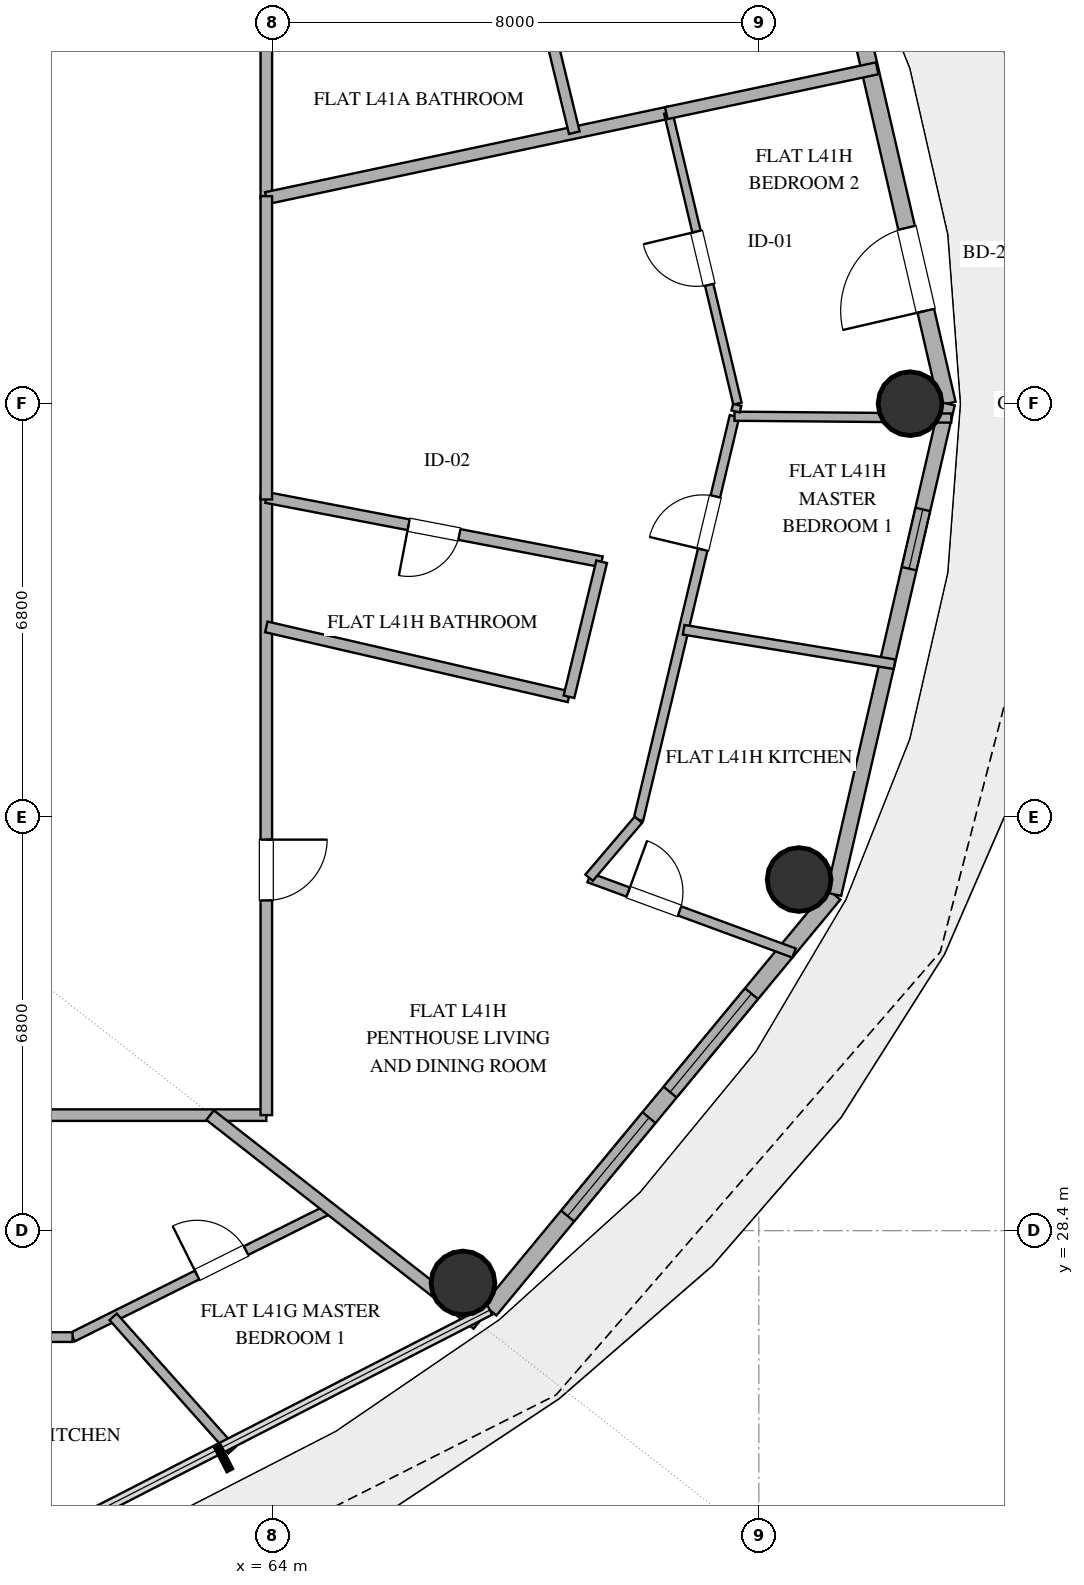
"""IFC4 building model, lengths in metres.
Left out: names, types, materials, properties, quantities, classifications, styles, units other than length and angle.
Written with IfcOpenShell. Run it as: python <this file> out.ifc"""

import sys

from ifc_helpers import new_model, si_unit, direction, frame, frame_2d, origin, origin_2d, place, context, subcontext, project, spatial, rectangle, hollow_circle, extrude, element, fill, save


model = new_model("IFC4")
c1 = context("Model", 3, precision=1e-05, world=origin(), true_north=direction((0.0, 1.0)))
c2 = subcontext(c1, "Body", "Model", "MODEL_VIEW")
j1 = project(units=[si_unit("LENGTHUNIT", "METRE"), si_unit("PLANEANGLEUNIT", "RADIAN")], contexts=[c1])
p1 = place(None, origin())
s1 = spatial("IfcSite", under=j1, at=p1, CompositionType="ELEMENT")
p2 = place(p1, origin())
s2 = spatial("IfcBuilding", under=s1, at=p2, CompositionType="ELEMENT")
p3 = place(p2, frame((0.0, 0.0, 165.0)))
s3 = spatial("IfcBuildingStorey", under=s2, at=p3, CompositionType="ELEMENT", Elevation=165.0)
for number, where, z_axis, x_axis in (
    (1, (74.487, 42.0, 0.0), (0.0, 0.0, 1.0), (1.0, 0.0, 0.0)),
    (2, (67.134, 27.54, 0.0), (0.0, 0.0, 1.0), (1.0, 0.0, 0.0)),
    (3, (72.662, 34.174, 0.0), (0.0, 0.0, 1.0), (1.0, 0.0, 0.0)),
):
    element("IfcColumn", number, at=place(p3, frame(where, z_axis=z_axis, x_axis=x_axis)), inside=s3, PredefinedType="COLUMN", context=c2, shape_type="SweptSolid", body=[
        extrude(hollow_circle(Radius=0.525, WallThickness=0.028, at=origin_2d()), origin(), (0.0, 0.0, 1.0), 3.38),
    ])
p4 = place(p3, frame((75.099, 42.0, 0.0), z_axis=(0.0, 0.0, 1.0), x_axis=(-0.225473184558, 0.974249374157, 0.0)))
e4 = element("IfcWall", 4, at=p4, inside=s3, PredefinedType="SOLIDWALL", context=c2, shape_type="SweptSolid", body=[
    extrude(rectangle(XDim=8.28, YDim=0.28, at=frame_2d((4.14, 0.0))), origin(), (0.0, 0.0, 1.0), 3.38),
])
p5 = place(p4, frame((1.568, 0.0, 0.0)))
e5 = element("IfcOpeningElement", 5, at=p5, cuts=e4, PredefinedType="OPENING", context=c2, shape_type="SweptSolid", body=[
    extrude(rectangle(XDim=1.4, YDim=2.2, at=frame_2d((0.7, 1.1))), frame((0.0, 0.15, 0.0), z_axis=(0.0, -1.0, 0.0), x_axis=(1.0, 0.0, 0.0)), (0.0, 0.0, 1.0), 0.3),
])
p6 = place(p3, frame((67.576, 27.094, 0.0), z_axis=(0.0, 0.0, 1.0), x_axis=(0.637333477683, 0.770588111915, 0.0)))
e6 = element("IfcWall", 6, at=p6, inside=s3, PredefinedType="SOLIDWALL", context=c2, shape_type="SweptSolid", body=[
    extrude(rectangle(XDim=8.875, YDim=0.28, at=frame_2d((4.438, 0.0))), origin(), (0.0, 0.0, 1.0), 3.38),
])
p7 = place(p6, frame((2.007, 0.0, 0.85)))
e7 = element("IfcOpeningElement", 7, at=p7, cuts=e6, PredefinedType="OPENING", context=c2, shape_type="SweptSolid", body=[
    extrude(rectangle(XDim=2.1, YDim=2.2, at=frame_2d((1.05, 1.1))), frame((0.0, 0.15, 0.0), z_axis=(0.0, -1.0, 0.0), x_axis=(1.0, 0.0, 0.0)), (0.0, 0.0, 1.0), 0.3),
])
p8 = place(p6, frame((4.652, 0.0, 0.85)))
e8 = element("IfcOpeningElement", 8, at=p8, cuts=e6, PredefinedType="OPENING", context=c2, shape_type="SweptSolid", body=[
    extrude(rectangle(XDim=2.1, YDim=2.2, at=frame_2d((1.05, 1.1))), frame((0.0, 0.15, 0.0), z_axis=(0.0, -1.0, 0.0), x_axis=(1.0, 0.0, 0.0)), (0.0, 0.0, 1.0), 0.3),
])
p9 = place(p3, frame((73.232, 33.933, 0.0), z_axis=(0.0, 0.0, 1.0), x_axis=(0.225473184558, 0.974249374157, 0.0)))
e9 = element("IfcWall", 9, at=p9, inside=s3, PredefinedType="SOLIDWALL", context=c2, shape_type="SweptSolid", body=[
    extrude(rectangle(XDim=8.28, YDim=0.25, at=frame_2d((4.14, 0.0))), origin(), (0.0, 0.0, 1.0), 3.38),
])
p10 = place(p9, frame((5.495, 0.0, 1.42)))
e10 = element("IfcOpeningElement", 10, at=p10, cuts=e9, PredefinedType="OPENING", context=c2, shape_type="SweptSolid", body=[
    extrude(rectangle(XDim=1.0, YDim=1.05, at=frame_2d((0.5, 0.525))), frame((0.0, 0.135, 0.0), z_axis=(0.0, -1.0, 0.0), x_axis=(1.0, 0.0, 0.0)), (0.0, 0.0, 1.0), 0.27),
])
p11 = place(p3, frame((63.9, 30.3, 0.0), z_axis=(0.0, 0.0, 1.0), x_axis=(-1.0, 0.0, 0.0)))
e11 = element("IfcWall", 11, at=p11, inside=s3, PredefinedType="PARTITIONING", context=c2, shape_type="SweptSolid", body=[
    extrude(rectangle(XDim=15.625, YDim=0.19, at=frame_2d((7.813, 0.0))), origin(), (0.0, 0.0, 1.0), 2.74),
])
p12 = place(p11, frame((6.137, 0.0, 0.0)))
e12 = element("IfcOpeningElement", 12, at=p12, cuts=e11, PredefinedType="OPENING", context=c2, shape_type="SweptSolid", body=[
    extrude(rectangle(XDim=1.0, YDim=2.2, at=frame_2d((0.5, 1.1))), frame((0.0, 0.105, 0.0), z_axis=(0.0, -1.0, 0.0), x_axis=(1.0, 0.0, 0.0)), (0.0, 0.0, 1.0), 0.21),
])
p13 = place(p3, frame((63.9, 40.49, 0.0), z_axis=(0.0, 0.0, 1.0), x_axis=(0.0, -1.0, 0.0)))
e13 = element("IfcWall", 13, at=p13, inside=s3, PredefinedType="PARTITIONING", context=c2, shape_type="SweptSolid", body=[
    extrude(rectangle(XDim=10.19, YDim=0.19, at=frame_2d((5.095, 0.0))), origin(), (0.0, 0.0, 1.0), 2.74),
])
p14 = place(p13, frame((5.659, 0.0, 0.0)))
e14 = element("IfcOpeningElement", 14, at=p14, cuts=e13, PredefinedType="OPENING", context=c2, shape_type="SweptSolid", body=[
    extrude(rectangle(XDim=1.0, YDim=2.2, at=frame_2d((0.5, 1.1))), frame((0.0, 0.105, 0.0), z_axis=(0.0, -1.0, 0.0), x_axis=(1.0, 0.0, 0.0)), (0.0, 0.0, 1.0), 0.21),
])
p15 = place(p3, frame((69.415, 39.4, 0.0), z_axis=(0.0, 0.0, 1.0), x_axis=(-0.98210492306, 0.188334596135, 0.0)))
e15 = element("IfcWall", 15, at=p15, inside=s3, PredefinedType="PLUMBINGWALL", context=c2, shape_type="SweptSolid", body=[
    extrude(rectangle(XDim=5.616, YDim=0.18, at=frame_2d((2.808, 0.0))), origin(), (0.0, 0.0, 1.0), 2.74),
])
p16 = place(p15, frame((2.383, 0.0, 0.0)))
e16 = element("IfcOpeningElement", 16, at=p16, cuts=e15, PredefinedType="OPENING", context=c2, shape_type="SweptSolid", body=[
    extrude(rectangle(XDim=0.85, YDim=2.1, at=frame_2d((0.425, 1.05))), frame((0.0, 0.1, 0.0), z_axis=(0.0, -1.0, 0.0), x_axis=(1.0, 0.0, 0.0)), (0.0, 0.0, 1.0), 0.2),
])
p17 = place(p3, frame((63.9, 53.7, 0.0), z_axis=(0.0, 0.0, 1.0), x_axis=(0.0, -1.0, 0.0)))
e17 = element("IfcWall", 17, at=p17, inside=s3, PredefinedType="PARTITIONING", context=c2, shape_type="SweptSolid", body=[
    extrude(rectangle(XDim=8.32, YDim=0.19, at=frame_2d((4.16, 0.0))), origin(), (0.0, 0.0, 1.0), 2.74),
])
p18 = place(p3, frame((63.9, 45.38, 0.0), z_axis=(0.0, 0.0, 1.0), x_axis=(0.978145779981, 0.207920256603, 0.0)))
e18 = element("IfcWall", 18, at=p18, inside=s3, PredefinedType="PARTITIONING", context=c2, shape_type="SweptSolid", body=[
    extrude(rectangle(XDim=6.789, YDim=0.2, at=frame_2d((3.395, 0.0))), origin(), (0.0, 0.0, 1.0), 2.74),
])
p19 = place(p3, frame((63.9, 38.329, 0.0), z_axis=(0.0, 0.0, 1.0), x_axis=(0.974377500084, -0.224918846098, 0.0)))
e19 = element("IfcWall", 19, at=p19, inside=s3, PredefinedType="PLUMBINGWALL", context=c2, shape_type="SweptSolid", body=[
    extrude(rectangle(XDim=5.108, YDim=0.18, at=frame_2d((2.554, 0.0))), origin(), (0.0, 0.0, 1.0), 2.74),
])
p20 = place(p3, frame((63.9, 45.412, 0.0), z_axis=(0.0, 0.0, 1.0), x_axis=(0.0, -1.0, 0.0)))
e20 = element("IfcWall", 20, at=p20, inside=s3, PredefinedType="PARTITIONING", context=c2, shape_type="SweptSolid", body=[
    extrude(rectangle(XDim=4.987, YDim=0.19, at=frame_2d((2.494, 0.0))), origin(), (0.0, 0.0, 1.0), 2.74),
])
p21 = place(p3, frame((71.649, 42.0, 0.0), z_axis=(0.0, 0.0, 1.0), x_axis=(-0.231622764326, 0.972805682059, 0.0)))
e21 = element("IfcWall", 21, at=p21, inside=s3, PredefinedType="PARTITIONING", context=c2, shape_type="SweptSolid", body=[
    extrude(rectangle(XDim=4.918, YDim=0.14, at=frame_2d((2.459, 0.0))), origin(), (0.0, 0.0, 1.0), 2.74),
])
p22 = place(p21, frame((2.009, 0.0, 0.0)))
e22 = element("IfcOpeningElement", 22, at=p22, cuts=e21, PredefinedType="OPENING", context=c2, shape_type="SweptSolid", body=[
    extrude(rectangle(XDim=0.9, YDim=2.1, at=frame_2d((0.45, 1.05))), frame((0.0, 0.08, 0.0), z_axis=(0.0, -1.0, 0.0), x_axis=(1.0, 0.0, 0.0)), (0.0, 0.0, 1.0), 0.16),
])
p23 = place(p3, frame((60.713, 26.65, 0.0), z_axis=(0.0, 0.0, 1.0), x_axis=(0.894932492822, 0.446201561283, 0.0)))
e23 = element("IfcWall", 23, at=p23, inside=s3, PredefinedType="PLUMBINGWALL", context=c2, shape_type="SweptSolid", body=[
    extrude(rectangle(XDim=4.729, YDim=0.16, at=frame_2d((2.365, 0.0))), origin(), (0.0, 0.0, 1.0), 2.74),
])
p24 = place(p23, frame((2.288, 0.0, 0.0)))
e24 = element("IfcOpeningElement", 24, at=p24, cuts=e23, PredefinedType="OPENING", context=c2, shape_type="SweptSolid", body=[
    extrude(rectangle(XDim=0.9, YDim=2.1, at=frame_2d((0.45, 1.05))), frame((0.0, 0.09, 0.0), z_axis=(0.0, -1.0, 0.0), x_axis=(1.0, 0.0, 0.0)), (0.0, 0.0, 1.0), 0.18),
])
p25 = place(p3, frame((70.019, 35.158, 0.0), z_axis=(0.0, 0.0, 1.0), x_axis=(0.231657621012, 0.972797382103, 0.0)))
e25 = element("IfcWall", 25, at=p25, inside=s3, PredefinedType="PLUMBINGWALL", context=c2, shape_type="SweptSolid", body=[
    extrude(rectangle(XDim=6.822, YDim=0.16, at=frame_2d((3.411, 0.0))), origin(), (0.0, 0.0, 1.0), 2.74),
])
p26 = place(p25, frame((4.567, 0.0, 0.0)))
e26 = element("IfcOpeningElement", 26, at=p26, cuts=e25, PredefinedType="OPENING", context=c2, shape_type="SweptSolid", body=[
    extrude(rectangle(XDim=0.9, YDim=2.1, at=frame_2d((0.45, 1.05))), frame((0.0, 0.09, 0.0), z_axis=(0.0, -1.0, 0.0), x_axis=(1.0, 0.0, 0.0)), (0.0, 0.0, 1.0), 0.18),
])
p27 = place(p3, frame((69.208, 34.205, 0.0), z_axis=(0.0, 0.0, 1.0), x_axis=(0.938602834346, -0.344999593272, 0.0)))
e27 = element("IfcWall", 27, at=p27, inside=s3, PredefinedType="PLUMBINGWALL", context=c2, shape_type="SweptSolid", body=[
    extrude(rectangle(XDim=3.591, YDim=0.16, at=frame_2d((1.796, 0.0))), origin(), (0.0, 0.0, 1.0), 2.74),
])
p28 = place(p27, frame((0.686, 0.0, 0.0)))
e28 = element("IfcOpeningElement", 28, at=p28, cuts=e27, PredefinedType="OPENING", context=c2, shape_type="SweptSolid", body=[
    extrude(rectangle(XDim=0.9, YDim=2.1, at=frame_2d((0.45, 1.05))), frame((0.0, 0.09, 0.0), z_axis=(0.0, -1.0, 0.0), x_axis=(1.0, 0.0, 0.0)), (0.0, 0.0, 1.0), 0.18),
])
p29 = place(p3, frame((75.165, 41.763, 0.0), z_axis=(0.0, 0.0, 1.0), x_axis=(-0.999962184605, 0.00869651424, 0.0)))
e29 = element("IfcWall", 29, at=p29, inside=s3, PredefinedType="PARTITIONING", context=c2, shape_type="SweptSolid", body=[
    extrude(rectangle(XDim=3.565, YDim=0.15, at=frame_2d((1.783, 0.0))), origin(), (0.0, 0.0, 1.0), 2.74),
])
p30 = place(p3, frame((73.946, 47.515, 0.0), z_axis=(0.0, 0.0, 1.0), x_axis=(-0.978135742848, -0.207967469966, 0.0)))
e30 = element("IfcWall", 30, at=p30, inside=s3, PredefinedType="PARTITIONING", context=c2, shape_type="SweptSolid", body=[
    extrude(rectangle(XDim=3.545, YDim=0.2, at=frame_2d((1.773, 0.0))), origin(), (0.0, 0.0, 1.0), 2.74),
])
p31 = place(p3, frame((74.231, 37.716, 0.0), z_axis=(0.0, 0.0, 1.0), x_axis=(-0.986918442879, 0.161220306117, 0.0)))
e31 = element("IfcWall", 31, at=p31, inside=s3, PredefinedType="PLUMBINGWALL", context=c2, shape_type="SweptSolid", body=[
    extrude(rectangle(XDim=3.513, YDim=0.16, at=frame_2d((1.757, 0.0))), origin(), (0.0, 0.0, 1.0), 2.74),
])
p32 = place(p3, frame((67.37, 26.866, 0.0), z_axis=(0.0, 0.0, 1.0), x_axis=(-0.788004464355, 0.615669525117, 0.0)))
e32 = element("IfcWall", 32, at=p32, inside=s3, PredefinedType="PARTITIONING", context=c2, shape_type="SweptSolid", body=[
    extrude(rectangle(XDim=5.577, YDim=0.2, at=frame_2d((2.789, 0.0))), origin(), (0.0, 0.0, 1.0), 2.74),
])
p33 = place(p3, frame((63.335, 24.79, 0.0), z_axis=(0.0, 0.0, 1.0), x_axis=(-0.665255741341, 0.746615562799, 0.0)))
e33 = element("IfcWall", 33, at=p33, inside=s3, PredefinedType="PLUMBINGWALL", context=c2, shape_type="SweptSolid", body=[
    extrude(rectangle(XDim=2.938, YDim=0.16, at=frame_2d((1.469, 0.0))), origin(), (0.0, 0.0, 1.0), 2.74),
])
p34 = place(p3, frame((68.877, 37.18, 0.0), z_axis=(0.0, 0.0, 1.0), x_axis=(0.235462364404, 0.971883467783, 0.0)))
e34 = element("IfcWall", 34, at=p34, inside=s3, PredefinedType="PLUMBINGWALL", context=c2, shape_type="SweptSolid", body=[
    extrude(rectangle(XDim=2.284, YDim=0.18, at=frame_2d((1.142, 0.0))), origin(), (0.0, 0.0, 1.0), 2.74),
])
p35 = place(p3, frame((68.965, 46.456, 0.0), z_axis=(0.0, 0.0, 1.0), x_axis=(-0.235442613623, 0.971888252676, 0.0)))
e35 = element("IfcWall", 35, at=p35, inside=s3, PredefinedType="PLUMBINGWALL", context=c2, shape_type="SweptSolid", body=[
    extrude(rectangle(XDim=1.865, YDim=0.18, at=frame_2d((0.932, 0.0))), origin(), (0.0, 0.0, 1.0), 2.74),
])
p36 = place(p3, frame((70.02, 35.158, 0.0), z_axis=(0.0, 0.0, 1.0), x_axis=(-0.648152333742, -0.761510703972, 0.0)))
e36 = element("IfcWall", 36, at=p36, inside=s3, PredefinedType="PLUMBINGWALL", context=c2, shape_type="SweptSolid", body=[
    extrude(rectangle(XDim=1.251, YDim=0.16, at=frame_2d((0.625, 0.0))), origin(), (0.0, 0.0, 1.0), 2.74),
])
p37 = place(p3, frame((60.713, 26.65, 0.0), z_axis=(0.0, 0.0, 1.0), x_axis=(-1.0, 0.0, 0.0)))
e37 = element("IfcWall", 37, at=p37, inside=s3, PredefinedType="PLUMBINGWALL", context=c2, shape_type="SweptSolid", body=[
    extrude(rectangle(XDim=1.062, YDim=0.16, at=frame_2d((0.531, 0.0))), origin(), (0.0, 0.0, 1.0), 2.74),
])
p38 = place(p3, frame((71.618, 41.872, 0.0), z_axis=(0.0, 0.0, 1.0), x_axis=(0.233786115402, 0.972288050037, 0.0)))
e38 = element("IfcWall", 38, at=p38, inside=s3, PredefinedType="PARTITIONING", context=c2, shape_type="SweptSolid", body=[
    extrude(rectangle(XDim=0.112, YDim=0.14, at=frame_2d((0.056, 0.0))), origin(), (0.0, 0.0, 1.0), 2.74),
])
p39 = place(p5, origin())
e39 = element("IfcDoor", 39, at=p39, inside=s3, OperationType="SINGLE_SWING_LEFT", PredefinedType="DOOR", context=c2, shape_type="SweptSolid", body=[
    extrude(rectangle(XDim=1.4, YDim=2.2, at=frame_2d((0.7, 1.1))), frame((0.0, 0.025, 0.0), z_axis=(0.0, -1.0, 0.0), x_axis=(1.0, 0.0, 0.0)), (0.0, 0.0, 1.0), 0.05),
])
fill(e5, e39)
p40 = place(p7, origin())
e40 = element("IfcWindow", 40, at=p40, inside=s3, PartitioningType="SINGLE_PANEL", PredefinedType="WINDOW", context=c2, shape_type="SweptSolid", body=[
    extrude(rectangle(XDim=2.1, YDim=2.2, at=frame_2d((1.05, 1.1))), frame((0.0, 0.03, 0.0), z_axis=(0.0, -1.0, 0.0), x_axis=(1.0, 0.0, 0.0)), (0.0, 0.0, 1.0), 0.06),
])
fill(e7, e40)
p41 = place(p8, origin())
e41 = element("IfcWindow", 41, at=p41, inside=s3, PartitioningType="SINGLE_PANEL", PredefinedType="WINDOW", context=c2, shape_type="SweptSolid", body=[
    extrude(rectangle(XDim=2.1, YDim=2.2, at=frame_2d((1.05, 1.1))), frame((0.0, 0.03, 0.0), z_axis=(0.0, -1.0, 0.0), x_axis=(1.0, 0.0, 0.0)), (0.0, 0.0, 1.0), 0.06),
])
fill(e8, e41)
p42 = place(p10, origin())
e42 = element("IfcWindow", 42, at=p42, inside=s3, PartitioningType="SINGLE_PANEL", PredefinedType="WINDOW", context=c2, shape_type="SweptSolid", body=[
    extrude(rectangle(XDim=1.0, YDim=1.05, at=frame_2d((0.5, 0.525))), frame((0.0, 0.03, 0.0), z_axis=(0.0, -1.0, 0.0), x_axis=(1.0, 0.0, 0.0)), (0.0, 0.0, 1.0), 0.06),
])
fill(e10, e42)
p43 = place(p14, origin())
e43 = element("IfcDoor", 43, at=p43, inside=s3, OperationType="SINGLE_SWING_LEFT", PredefinedType="DOOR", context=c2, shape_type="SweptSolid", body=[
    extrude(rectangle(XDim=1.0, YDim=2.2, at=frame_2d((0.5, 1.1))), frame((0.0, 0.025, 0.0), z_axis=(0.0, -1.0, 0.0), x_axis=(1.0, 0.0, 0.0)), (0.0, 0.0, 1.0), 0.05),
])
fill(e14, e43)
p44 = place(p16, origin())
e44 = element("IfcDoor", 44, at=p44, inside=s3, OperationType="SINGLE_SWING_RIGHT", PredefinedType="DOOR", context=c2, shape_type="SweptSolid", body=[
    extrude(rectangle(XDim=0.85, YDim=2.1, at=frame_2d((0.425, 1.05))), frame((0.0, 0.025, 0.0), z_axis=(0.0, -1.0, 0.0), x_axis=(1.0, 0.0, 0.0)), (0.0, 0.0, 1.0), 0.05),
])
fill(e16, e44)
p45 = place(p22, origin())
e45 = element("IfcDoor", 45, at=p45, inside=s3, OperationType="SINGLE_SWING_RIGHT", PredefinedType="DOOR", context=c2, shape_type="SweptSolid", body=[
    extrude(rectangle(XDim=0.9, YDim=2.1, at=frame_2d((0.45, 1.05))), frame((0.0, 0.025, 0.0), z_axis=(0.0, -1.0, 0.0), x_axis=(1.0, 0.0, 0.0)), (0.0, 0.0, 1.0), 0.05),
])
fill(e22, e45)
p46 = place(p24, origin())
e46 = element("IfcDoor", 46, at=p46, inside=s3, OperationType="SINGLE_SWING_LEFT", PredefinedType="DOOR", context=c2, shape_type="SweptSolid", body=[
    extrude(rectangle(XDim=0.9, YDim=2.1, at=frame_2d((0.45, 1.05))), frame((0.0, 0.025, 0.0), z_axis=(0.0, -1.0, 0.0), x_axis=(1.0, 0.0, 0.0)), (0.0, 0.0, 1.0), 0.05),
])
fill(e24, e46)
p47 = place(p26, origin())
e47 = element("IfcDoor", 47, at=p47, inside=s3, OperationType="SINGLE_SWING_LEFT", PredefinedType="DOOR", context=c2, shape_type="SweptSolid", body=[
    extrude(rectangle(XDim=0.9, YDim=2.1, at=frame_2d((0.45, 1.05))), frame((0.0, 0.025, 0.0), z_axis=(0.0, -1.0, 0.0), x_axis=(1.0, 0.0, 0.0)), (0.0, 0.0, 1.0), 0.05),
])
fill(e26, e47)
p48 = place(p28, origin())
e48 = element("IfcDoor", 48, at=p48, inside=s3, OperationType="SINGLE_SWING_LEFT", PredefinedType="DOOR", context=c2, shape_type="SweptSolid", body=[
    extrude(rectangle(XDim=0.9, YDim=2.1, at=frame_2d((0.45, 1.05))), frame((0.0, 0.025, 0.0), z_axis=(0.0, -1.0, 0.0), x_axis=(1.0, 0.0, 0.0)), (0.0, 0.0, 1.0), 0.05),
])
fill(e28, e48)
save(model, sys.argv[1])
